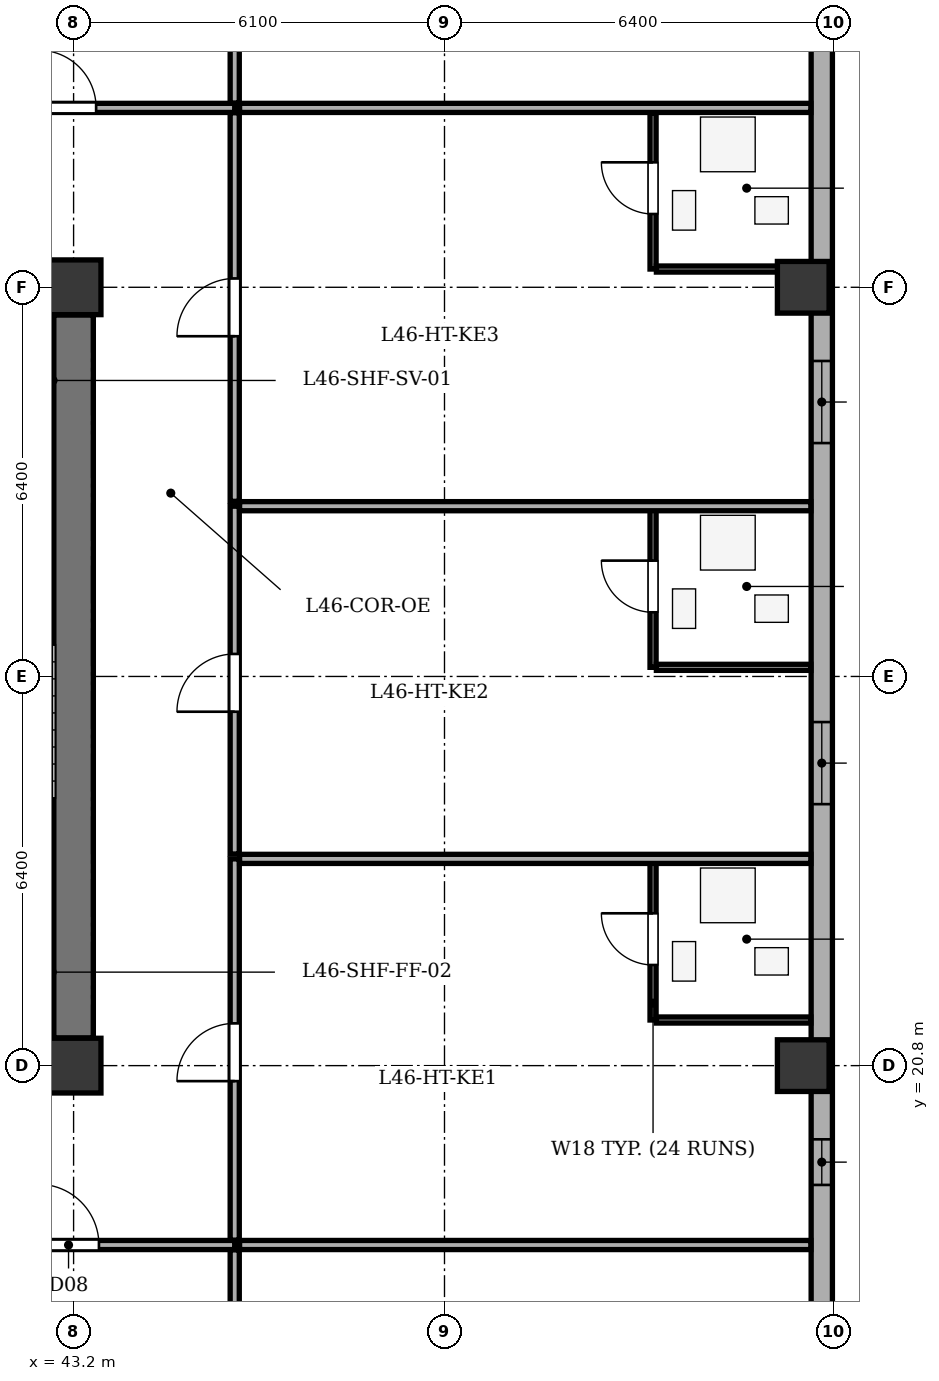
"""IFC4 building model, lengths in metres.
Left out: names, types, materials, properties, quantities, classifications, styles, units other than length and angle.
Written with IfcOpenShell. Run it as: python <this file> out.ifc"""

import sys

from ifc_helpers import new_model, si_unit, direction, frame, frame_2d, origin, origin_2d, place, context, subcontext, project, spatial, rectangle, extrude, element, fill, save


model = new_model("IFC4")
c1 = context("Model", 3, precision=1e-05, world=origin(), true_north=direction((0.0, 1.0)))
c2 = subcontext(c1, "Body", "Model", "MODEL_VIEW")
j1 = project(units=[si_unit("LENGTHUNIT", "METRE"), si_unit("PLANEANGLEUNIT", "RADIAN")], contexts=[c1])
p1 = place(None, origin())
s1 = spatial("IfcSite", under=j1, at=p1, CompositionType="ELEMENT")
p2 = place(p1, origin())
s2 = spatial("IfcBuilding", under=s1, at=p2, CompositionType="ELEMENT")
p3 = place(p2, frame((0.0, 0.0, 179.8)))
s3 = spatial("IfcBuildingStorey", under=s2, at=p3, CompositionType="ELEMENT", Elevation=179.8)
for number, where, z_axis, x_axis in (
    (1, (43.2, 20.8, 0.0), (0.0, 0.0, 1.0), (1.0, 0.0, 0.0)),
    (2, (43.2, 33.6, 0.0), (0.0, 0.0, 1.0), (1.0, 0.0, 0.0)),
):
    element("IfcColumn", number, at=place(p3, frame(where, z_axis=z_axis, x_axis=x_axis)), inside=s3, PredefinedType="COLUMN", context=c2, shape_type="SweptSolid", body=[
        extrude(rectangle(XDim=0.9, YDim=0.9, at=origin_2d()), origin(), (0.0, 0.0, 1.0), 3.5),
    ])
for number, where, z_axis, x_axis in (
    (3, (55.2, 20.8, 0.0), (0.0, 0.0, 1.0), (1.0, 0.0, 0.0)),
    (4, (55.2, 33.6, 0.0), (0.0, 0.0, 1.0), (1.0, 0.0, 0.0)),
):
    element("IfcColumn", number, at=place(p3, frame(where, z_axis=z_axis, x_axis=x_axis)), inside=s3, PredefinedType="COLUMN", context=c2, shape_type="SweptSolid", body=[
        extrude(rectangle(XDim=0.85, YDim=0.85, at=origin_2d()), origin(), (0.0, 0.0, 1.0), 3.5),
    ])
p4 = place(p3, frame((55.505, 47.9, 0.0), z_axis=(0.0, 0.0, 1.0), x_axis=(0.0, -1.0, 0.0)))
e5 = element("IfcWall", 5, at=p4, inside=s3, PredefinedType="STANDARD", context=c2, shape_type="SweptSolid", body=[
    extrude(rectangle(XDim=35.0, YDim=0.35, at=frame_2d((17.5, 0.0))), origin(), (0.0, 0.0, 1.0), 2.435),
])
p5 = place(p4, frame((2.613, 0.0, 0.75)))
e6 = element("IfcOpeningElement", 6, at=p5, cuts=e5, PredefinedType="OPENING", context=c2, shape_type="SweptSolid", body=[
    extrude(rectangle(XDim=1.6, YDim=1.565, at=frame_2d((0.8, 0.782))), frame((0.0, 0.185, 0.0), z_axis=(0.0, -1.0, 0.0), x_axis=(1.0, 0.0, 0.0)), (0.0, 0.0, 1.0), 0.37),
])
p6 = place(p4, frame((7.187, 0.0, 0.75)))
e7 = element("IfcOpeningElement", 7, at=p6, cuts=e5, PredefinedType="OPENING", context=c2, shape_type="SweptSolid", body=[
    extrude(rectangle(XDim=2.1, YDim=1.565, at=frame_2d((1.05, 0.782))), frame((0.0, 0.185, 0.0), z_axis=(0.0, -1.0, 0.0), x_axis=(1.0, 0.0, 0.0)), (0.0, 0.0, 1.0), 0.37),
])
p7 = place(p4, frame((15.512, 0.0, 0.75)))
e8 = element("IfcOpeningElement", 8, at=p7, cuts=e5, PredefinedType="OPENING", context=c2, shape_type="SweptSolid", body=[
    extrude(rectangle(XDim=1.35, YDim=1.565, at=frame_2d((0.675, 0.782))), frame((0.0, 0.185, 0.0), z_axis=(0.0, -1.0, 0.0), x_axis=(1.0, 0.0, 0.0)), (0.0, 0.0, 1.0), 0.37),
])
p8 = place(p4, frame((21.45, 0.0, 0.75)))
e9 = element("IfcOpeningElement", 9, at=p8, cuts=e5, PredefinedType="OPENING", context=c2, shape_type="SweptSolid", body=[
    extrude(rectangle(XDim=1.35, YDim=1.565, at=frame_2d((0.675, 0.782))), frame((0.0, 0.185, 0.0), z_axis=(0.0, -1.0, 0.0), x_axis=(1.0, 0.0, 0.0)), (0.0, 0.0, 1.0), 0.37),
])
p9 = place(p4, frame((31.575, 0.0, 0.75)))
e10 = element("IfcOpeningElement", 10, at=p9, cuts=e5, PredefinedType="OPENING", context=c2, shape_type="SweptSolid", body=[
    extrude(rectangle(XDim=1.6, YDim=1.565, at=frame_2d((0.8, 0.782))), frame((0.0, 0.185, 0.0), z_axis=(0.0, -1.0, 0.0), x_axis=(1.0, 0.0, 0.0)), (0.0, 0.0, 1.0), 0.37),
])
p10 = place(p4, frame((28.312, 0.0, 0.75)))
e11 = element("IfcOpeningElement", 11, at=p10, cuts=e5, PredefinedType="OPENING", context=c2, shape_type="SweptSolid", body=[
    extrude(rectangle(XDim=0.75, YDim=1.45, at=frame_2d((0.375, 0.725))), frame((0.0, 0.185, 0.0), z_axis=(0.0, -1.0, 0.0), x_axis=(1.0, 0.0, 0.0)), (0.0, 0.0, 1.0), 0.37),
])
p11 = place(p3, frame((43.2, 21.255, 0.0), z_axis=(0.0, 0.0, 1.0), x_axis=(0.0, 1.0, 0.0)))
e12 = element("IfcWall", 12, at=p11, inside=s3, PredefinedType="SHEAR", context=c2, shape_type="SweptSolid", body=[
    extrude(rectangle(XDim=11.89, YDim=0.65, at=frame_2d((5.945, 0.0))), origin(), (0.0, 0.0, 1.0), 3.05),
])
for number, where, z_axis, x_axis in (
    (13, (39.69, 23.57, 0.0), (0.0, 0.0, 1.0), (1.0, 0.0, 0.0)),
    (14, (39.69, 30.83, 0.0), (0.0, 0.0, 1.0), (1.0, 0.0, 0.0)),
):
    element("IfcWall", number, at=place(p3, frame(where, z_axis=z_axis, x_axis=x_axis)), inside=s3, PredefinedType="SHEAR", context=c2, shape_type="SweptSolid", body=[
        extrude(rectangle(XDim=3.175, YDim=0.25, at=frame_2d((1.587, 0.0))), origin(), (0.0, 0.0, 1.0), 3.05),
    ])
p12 = place(p3, frame((40.503, 17.85, 0.0), z_axis=(0.0, 0.0, 1.0), x_axis=(1.0, 0.0, 0.0)))
e15 = element("IfcWall", 15, at=p12, inside=s3, PredefinedType="PARTITIONING", context=c2, shape_type="SweptSolid", body=[
    extrude(rectangle(XDim=5.347, YDim=0.15, at=frame_2d((2.674, 0.0))), origin(), (0.0, 0.0, 1.0), 3.05),
])
p13 = place(p12, frame((2.114, 0.0, 0.0)))
e16 = element("IfcOpeningElement", 16, at=p13, cuts=e15, PredefinedType="OPENING", context=c2, shape_type="SweptSolid", body=[
    extrude(rectangle(XDim=1.0, YDim=2.1, at=frame_2d((0.5, 1.05))), frame((0.0, 0.085, 0.0), z_axis=(0.0, -1.0, 0.0), x_axis=(1.0, 0.0, 0.0)), (0.0, 0.0, 1.0), 0.17),
])
p14 = place(p3, frame((45.85, 8.275, 0.0), z_axis=(0.0, 0.0, 1.0), x_axis=(0.0, 1.0, 0.0)))
e17 = element("IfcWall", 17, at=p14, inside=s3, PredefinedType="PARTITIONING", context=c2, shape_type="SweptSolid", body=[
    extrude(rectangle(XDim=9.495, YDim=0.15, at=frame_2d((4.748, 0.0))), origin(), (0.0, 0.0, 1.0), 3.05),
])
p15 = place(p3, frame((40.351, 36.55, 0.0), z_axis=(0.0, 0.0, 1.0), x_axis=(1.0, 0.0, 0.0)))
e18 = element("IfcWall", 18, at=p15, inside=s3, PredefinedType="PARTITIONING", context=c2, shape_type="SweptSolid", body=[
    extrude(rectangle(XDim=5.5, YDim=0.15, at=frame_2d((2.75, 0.0))), origin(), (0.0, 0.0, 1.0), 3.05),
])
p16 = place(p15, frame((2.27, 0.0, 0.0)))
e19 = element("IfcOpeningElement", 19, at=p16, cuts=e18, PredefinedType="OPENING", context=c2, shape_type="SweptSolid", body=[
    extrude(rectangle(XDim=0.95, YDim=2.1, at=frame_2d((0.475, 1.05))), frame((0.0, 0.085, 0.0), z_axis=(0.0, -1.0, 0.0), x_axis=(1.0, 0.0, 0.0)), (0.0, 0.0, 1.0), 0.17),
])
p17 = place(p3, frame((45.85, 36.63, 0.0), z_axis=(0.0, 0.0, 1.0), x_axis=(0.0, 1.0, 0.0)))
e20 = element("IfcWall", 20, at=p17, inside=s3, PredefinedType="PARTITIONING", context=c2, shape_type="SweptSolid", body=[
    extrude(rectangle(XDim=15.895, YDim=0.15, at=frame_2d((7.948, 0.0))), origin(), (0.0, 0.0, 1.0), 3.05),
])
for number, where, z_axis, x_axis in (
    (21, (45.93, 17.85, 0.0), (0.0, 0.0, 1.0), (1.0, 0.0, 0.0)),
    (22, (45.93, 36.55, 0.0), (0.0, 0.0, 1.0), (1.0, 0.0, 0.0)),
):
    element("IfcWall", number, at=place(p3, frame(where, z_axis=z_axis, x_axis=x_axis)), inside=s3, PredefinedType="PARTITIONING", context=c2, shape_type="SweptSolid", body=[
        extrude(rectangle(XDim=9.395, YDim=0.15, at=frame_2d((4.698, 0.0))), origin(), (0.0, 0.0, 1.0), 3.05),
    ])
p18 = place(p3, frame((45.85, 17.93, 0.0), z_axis=(0.0, 0.0, 1.0), x_axis=(0.0, 1.0, 0.0)))
e23 = element("IfcWall", 23, at=p18, inside=s3, PredefinedType="PARTITIONING", context=c2, shape_type="SweptSolid", body=[
    extrude(rectangle(XDim=6.27, YDim=0.15, at=frame_2d((3.135, 0.0))), origin(), (0.0, 0.0, 1.0), 3.05),
])
p19 = place(p18, frame((2.615, 0.0, 0.0)))
e24 = element("IfcOpeningElement", 24, at=p19, cuts=e23, PredefinedType="OPENING", context=c2, shape_type="SweptSolid", body=[
    extrude(rectangle(XDim=0.95, YDim=2.1, at=frame_2d((0.475, 1.05))), frame((0.0, 0.085, 0.0), z_axis=(0.0, -1.0, 0.0), x_axis=(1.0, 0.0, 0.0)), (0.0, 0.0, 1.0), 0.17),
])
p20 = place(p3, frame((52.73, 21.55, 0.0), z_axis=(0.0, 0.0, 1.0), x_axis=(0.0, 1.0, 0.0)))
e25 = element("IfcWall", 25, at=p20, inside=s3, PredefinedType="PARTITIONING", context=c2, shape_type="SweptSolid", body=[
    extrude(rectangle(XDim=2.65, YDim=0.1, at=frame_2d((1.325, 0.0))), origin(), (0.0, 0.0, 1.0), 3.05),
])
p21 = place(p20, frame((0.905, 0.0, 0.0)))
e26 = element("IfcOpeningElement", 26, at=p21, cuts=e25, PredefinedType="OPENING", context=c2, shape_type="SweptSolid", body=[
    extrude(rectangle(XDim=0.85, YDim=2.05, at=frame_2d((0.425, 1.025))), frame((0.0, 0.06, 0.0), z_axis=(0.0, -1.0, 0.0), x_axis=(1.0, 0.0, 0.0)), (0.0, 0.0, 1.0), 0.12),
])
p22 = place(p3, frame((52.785, 21.55, 0.0), z_axis=(0.0, 0.0, 1.0), x_axis=(1.0, 0.0, 0.0)))
e27 = element("IfcWall", 27, at=p22, inside=s3, PredefinedType="PARTITIONING", context=c2, shape_type="SweptSolid", body=[
    extrude(rectangle(XDim=2.54, YDim=0.1, at=frame_2d((1.27, 0.0))), origin(), (0.0, 0.0, 1.0), 3.05),
])
p23 = place(p3, frame((45.93, 24.2, 0.0), z_axis=(0.0, 0.0, 1.0), x_axis=(1.0, 0.0, 0.0)))
e28 = element("IfcWall", 28, at=p23, inside=s3, PredefinedType="PARTITIONING", context=c2, shape_type="SweptSolid", body=[
    extrude(rectangle(XDim=9.395, YDim=0.15, at=frame_2d((4.698, 0.0))), origin(), (0.0, 0.0, 1.0), 3.05),
])
p24 = place(p3, frame((45.85, 24.28, 0.0), z_axis=(0.0, 0.0, 1.0), x_axis=(0.0, 1.0, 0.0)))
e29 = element("IfcWall", 29, at=p24, inside=s3, PredefinedType="PARTITIONING", context=c2, shape_type="SweptSolid", body=[
    extrude(rectangle(XDim=5.72, YDim=0.15, at=frame_2d((2.86, 0.0))), origin(), (0.0, 0.0, 1.0), 3.05),
])
p25 = place(p24, frame((2.34, 0.0, 0.0)))
e30 = element("IfcOpeningElement", 30, at=p25, cuts=e29, PredefinedType="OPENING", context=c2, shape_type="SweptSolid", body=[
    extrude(rectangle(XDim=0.95, YDim=2.1, at=frame_2d((0.475, 1.05))), frame((0.0, 0.085, 0.0), z_axis=(0.0, -1.0, 0.0), x_axis=(1.0, 0.0, 0.0)), (0.0, 0.0, 1.0), 0.17),
])
p26 = place(p3, frame((52.73, 27.35, 0.0), z_axis=(0.0, 0.0, 1.0), x_axis=(0.0, 1.0, 0.0)))
e31 = element("IfcWall", 31, at=p26, inside=s3, PredefinedType="PARTITIONING", context=c2, shape_type="SweptSolid", body=[
    extrude(rectangle(XDim=2.65, YDim=0.1, at=frame_2d((1.325, 0.0))), origin(), (0.0, 0.0, 1.0), 3.05),
])
p27 = place(p26, frame((0.905, 0.0, 0.0)))
e32 = element("IfcOpeningElement", 32, at=p27, cuts=e31, PredefinedType="OPENING", context=c2, shape_type="SweptSolid", body=[
    extrude(rectangle(XDim=0.85, YDim=2.05, at=frame_2d((0.425, 1.025))), frame((0.0, 0.06, 0.0), z_axis=(0.0, -1.0, 0.0), x_axis=(1.0, 0.0, 0.0)), (0.0, 0.0, 1.0), 0.12),
])
p28 = place(p3, frame((52.785, 27.35, 0.0), z_axis=(0.0, 0.0, 1.0), x_axis=(1.0, 0.0, 0.0)))
e33 = element("IfcWall", 33, at=p28, inside=s3, PredefinedType="PARTITIONING", context=c2, shape_type="SweptSolid", body=[
    extrude(rectangle(XDim=2.54, YDim=0.1, at=frame_2d((1.27, 0.0))), origin(), (0.0, 0.0, 1.0), 3.05),
])
p29 = place(p3, frame((45.93, 30.0, 0.0), z_axis=(0.0, 0.0, 1.0), x_axis=(1.0, 0.0, 0.0)))
e34 = element("IfcWall", 34, at=p29, inside=s3, PredefinedType="PARTITIONING", context=c2, shape_type="SweptSolid", body=[
    extrude(rectangle(XDim=9.395, YDim=0.15, at=frame_2d((4.698, 0.0))), origin(), (0.0, 0.0, 1.0), 3.05),
])
p30 = place(p3, frame((45.85, 30.08, 0.0), z_axis=(0.0, 0.0, 1.0), x_axis=(0.0, 1.0, 0.0)))
e35 = element("IfcWall", 35, at=p30, inside=s3, PredefinedType="PARTITIONING", context=c2, shape_type="SweptSolid", body=[
    extrude(rectangle(XDim=6.39, YDim=0.15, at=frame_2d((3.195, 0.0))), origin(), (0.0, 0.0, 1.0), 3.05),
])
p31 = place(p30, frame((2.715, 0.0, 0.0)))
e36 = element("IfcOpeningElement", 36, at=p31, cuts=e35, PredefinedType="OPENING", context=c2, shape_type="SweptSolid", body=[
    extrude(rectangle(XDim=0.95, YDim=2.1, at=frame_2d((0.475, 1.05))), frame((0.0, 0.085, 0.0), z_axis=(0.0, -1.0, 0.0), x_axis=(1.0, 0.0, 0.0)), (0.0, 0.0, 1.0), 0.17),
])
p32 = place(p3, frame((52.73, 33.9, 0.0), z_axis=(0.0, 0.0, 1.0), x_axis=(0.0, 1.0, 0.0)))
e37 = element("IfcWall", 37, at=p32, inside=s3, PredefinedType="PARTITIONING", context=c2, shape_type="SweptSolid", body=[
    extrude(rectangle(XDim=2.57, YDim=0.1, at=frame_2d((1.285, 0.0))), origin(), (0.0, 0.0, 1.0), 3.05),
])
p33 = place(p32, frame((0.905, 0.0, 0.0)))
e38 = element("IfcOpeningElement", 38, at=p33, cuts=e37, PredefinedType="OPENING", context=c2, shape_type="SweptSolid", body=[
    extrude(rectangle(XDim=0.85, YDim=2.05, at=frame_2d((0.425, 1.025))), frame((0.0, 0.06, 0.0), z_axis=(0.0, -1.0, 0.0), x_axis=(1.0, 0.0, 0.0)), (0.0, 0.0, 1.0), 0.12),
])
p34 = place(p3, frame((52.785, 33.9, 0.0), z_axis=(0.0, 0.0, 1.0), x_axis=(1.0, 0.0, 0.0)))
e39 = element("IfcWall", 39, at=p34, inside=s3, PredefinedType="PARTITIONING", context=c2, shape_type="SweptSolid", body=[
    extrude(rectangle(XDim=2.54, YDim=0.1, at=frame_2d((1.27, 0.0))), origin(), (0.0, 0.0, 1.0), 3.05),
])
p35 = place(p7, origin())
e40 = element("IfcWindow", 40, at=p35, inside=s3, PartitioningType="SINGLE_PANEL", PredefinedType="WINDOW", context=c2, shape_type="SweptSolid", body=[
    extrude(rectangle(XDim=1.35, YDim=1.565, at=frame_2d((0.675, 0.782))), frame((0.0, -0.01, 0.0), z_axis=(0.0, -1.0, 0.0), x_axis=(1.0, 0.0, 0.0)), (0.0, 0.0, 1.0), 0.06),
])
fill(e8, e40)
p36 = place(p8, origin())
e41 = element("IfcWindow", 41, at=p36, inside=s3, PartitioningType="SINGLE_PANEL", PredefinedType="WINDOW", context=c2, shape_type="SweptSolid", body=[
    extrude(rectangle(XDim=1.35, YDim=1.565, at=frame_2d((0.675, 0.782))), frame((0.0, -0.01, 0.0), z_axis=(0.0, -1.0, 0.0), x_axis=(1.0, 0.0, 0.0)), (0.0, 0.0, 1.0), 0.06),
])
fill(e9, e41)
p37 = place(p10, origin())
e42 = element("IfcWindow", 42, at=p37, inside=s3, PartitioningType="SINGLE_PANEL", PredefinedType="WINDOW", context=c2, shape_type="SweptSolid", body=[
    extrude(rectangle(XDim=0.75, YDim=1.45, at=frame_2d((0.375, 0.725))), frame((0.0, -0.01, 0.0), z_axis=(0.0, -1.0, 0.0), x_axis=(1.0, 0.0, 0.0)), (0.0, 0.0, 1.0), 0.06),
])
fill(e11, e42)
p38 = place(p13, origin())
e43 = element("IfcDoor", 43, at=p38, inside=s3, OperationType="SINGLE_SWING_LEFT", PredefinedType="DOOR", context=c2, shape_type="SweptSolid", body=[
    extrude(rectangle(XDim=1.0, YDim=2.1, at=frame_2d((0.5, 1.05))), frame((0.0, 0.025, 0.0), z_axis=(0.0, -1.0, 0.0), x_axis=(1.0, 0.0, 0.0)), (0.0, 0.0, 1.0), 0.05),
])
fill(e16, e43)
p39 = place(p16, origin())
e44 = element("IfcDoor", 44, at=p39, inside=s3, OperationType="SINGLE_SWING_LEFT", PredefinedType="DOOR", context=c2, shape_type="SweptSolid", body=[
    extrude(rectangle(XDim=0.95, YDim=2.1, at=frame_2d((0.475, 1.05))), frame((0.0, 0.025, 0.0), z_axis=(0.0, -1.0, 0.0), x_axis=(1.0, 0.0, 0.0)), (0.0, 0.0, 1.0), 0.05),
])
fill(e19, e44)
p40 = place(p21, origin())
e45 = element("IfcDoor", 45, at=p40, inside=s3, OperationType="SINGLE_SWING_RIGHT", PredefinedType="DOOR", context=c2, shape_type="SweptSolid", body=[
    extrude(rectangle(XDim=0.85, YDim=2.05, at=frame_2d((0.425, 1.025))), frame((0.0, 0.025, 0.0), z_axis=(0.0, -1.0, 0.0), x_axis=(1.0, 0.0, 0.0)), (0.0, 0.0, 1.0), 0.05),
])
fill(e26, e45)
p41 = place(p19, origin())
e46 = element("IfcDoor", 46, at=p41, inside=s3, OperationType="SINGLE_SWING_LEFT", PredefinedType="DOOR", context=c2, shape_type="SweptSolid", body=[
    extrude(rectangle(XDim=0.95, YDim=2.1, at=frame_2d((0.475, 1.05))), frame((0.0, 0.025, 0.0), z_axis=(0.0, -1.0, 0.0), x_axis=(1.0, 0.0, 0.0)), (0.0, 0.0, 1.0), 0.05),
])
fill(e24, e46)
p42 = place(p27, origin())
e47 = element("IfcDoor", 47, at=p42, inside=s3, OperationType="SINGLE_SWING_RIGHT", PredefinedType="DOOR", context=c2, shape_type="SweptSolid", body=[
    extrude(rectangle(XDim=0.85, YDim=2.05, at=frame_2d((0.425, 1.025))), frame((0.0, 0.025, 0.0), z_axis=(0.0, -1.0, 0.0), x_axis=(1.0, 0.0, 0.0)), (0.0, 0.0, 1.0), 0.05),
])
fill(e32, e47)
p43 = place(p25, origin())
e48 = element("IfcDoor", 48, at=p43, inside=s3, OperationType="SINGLE_SWING_LEFT", PredefinedType="DOOR", context=c2, shape_type="SweptSolid", body=[
    extrude(rectangle(XDim=0.95, YDim=2.1, at=frame_2d((0.475, 1.05))), frame((0.0, 0.025, 0.0), z_axis=(0.0, -1.0, 0.0), x_axis=(1.0, 0.0, 0.0)), (0.0, 0.0, 1.0), 0.05),
])
fill(e30, e48)
p44 = place(p33, origin())
e49 = element("IfcDoor", 49, at=p44, inside=s3, OperationType="SINGLE_SWING_RIGHT", PredefinedType="DOOR", context=c2, shape_type="SweptSolid", body=[
    extrude(rectangle(XDim=0.85, YDim=2.05, at=frame_2d((0.425, 1.025))), frame((0.0, 0.025, 0.0), z_axis=(0.0, -1.0, 0.0), x_axis=(1.0, 0.0, 0.0)), (0.0, 0.0, 1.0), 0.05),
])
fill(e38, e49)
p45 = place(p31, origin())
e50 = element("IfcDoor", 50, at=p45, inside=s3, OperationType="SINGLE_SWING_LEFT", PredefinedType="DOOR", context=c2, shape_type="SweptSolid", body=[
    extrude(rectangle(XDim=0.95, YDim=2.1, at=frame_2d((0.475, 1.05))), frame((0.0, 0.025, 0.0), z_axis=(0.0, -1.0, 0.0), x_axis=(1.0, 0.0, 0.0)), (0.0, 0.0, 1.0), 0.05),
])
fill(e36, e50)
save(model, sys.argv[1])
